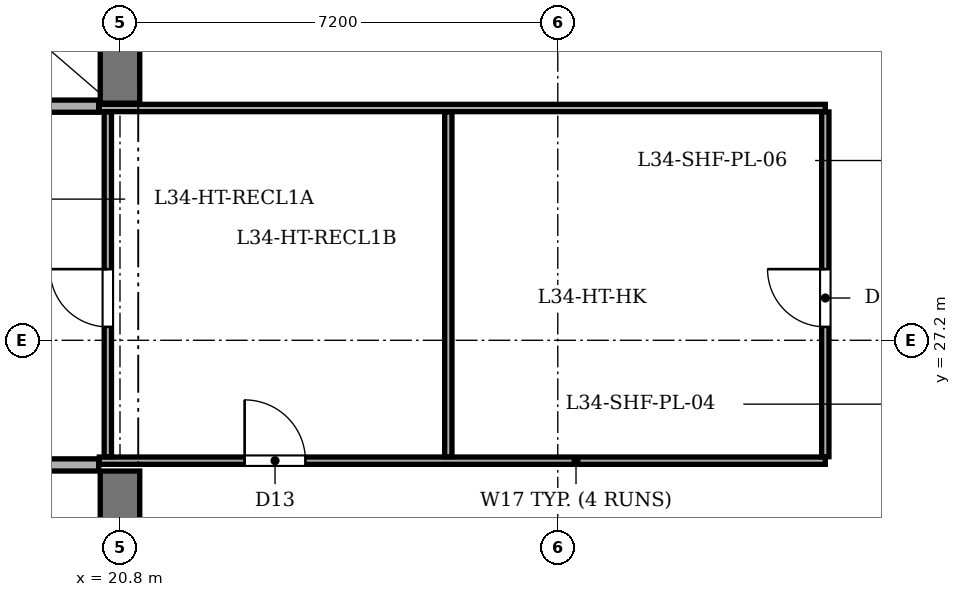
"""IFC4 building model, lengths in metres.
Left out: names, types, materials, properties, quantities, classifications, styles, units other than length and angle.
Written with IfcOpenShell. Run it as: python <this file> out.ifc"""

import sys

from ifc_helpers import new_model, si_unit, direction, frame, frame_2d, origin, place, context, subcontext, project, spatial, rectangle, extrude, element, fill, save


model = new_model("IFC4")
c1 = context("Model", 3, precision=1e-05, world=origin(), true_north=direction((0.0, 1.0)))
c2 = subcontext(c1, "Body", "Model", "MODEL_VIEW")
j1 = project(units=[si_unit("LENGTHUNIT", "METRE"), si_unit("PLANEANGLEUNIT", "RADIAN")], contexts=[c1])
p1 = place(None, origin())
s1 = spatial("IfcSite", under=j1, at=p1, CompositionType="ELEMENT")
p2 = place(p1, origin())
s2 = spatial("IfcBuilding", under=s1, at=p2, CompositionType="ELEMENT")
p3 = place(p2, frame((0.0, 0.0, 137.8)))
s3 = spatial("IfcBuildingStorey", under=s2, at=p3, CompositionType="ELEMENT", Elevation=137.8)
p4 = place(p3, frame((20.8, 21.305, 0.0), z_axis=(0.0, 0.0, 1.0), x_axis=(0.0, 1.0, 0.0)))
e1 = element("IfcWall", 1, at=p4, inside=s3, PredefinedType="SHEAR", context=c2, shape_type="SweptSolid", body=[
    extrude(rectangle(XDim=3.745, YDim=0.65, at=frame_2d((1.873, 0.0))), origin(), (0.0, 0.0, 1.0), 3.05),
])
p5 = place(p4, frame((1.295, 0.0, 0.0)))
e2 = element("IfcOpeningElement", 2, at=p5, cuts=e1, PredefinedType="OPENING", context=c2, shape_type="SweptSolid", body=[
    extrude(rectangle(XDim=1.2, YDim=2.15, at=frame_2d((0.6, 1.075))), frame((0.0, 0.335, 0.0), z_axis=(0.0, -1.0, 0.0), x_axis=(1.0, 0.0, 0.0)), (0.0, 0.0, 1.0), 0.67),
])
p6 = place(p3, frame((20.8, 31.1, 0.0), z_axis=(0.0, 0.0, 1.0), x_axis=(0.0, 1.0, 0.0)))
e3 = element("IfcWall", 3, at=p6, inside=s3, PredefinedType="SHEAR", context=c2, shape_type="SweptSolid", body=[
    extrude(rectangle(XDim=1.995, YDim=0.65, at=frame_2d((0.998, 0.0))), origin(), (0.0, 0.0, 1.0), 3.05),
])
for number, where, z_axis, x_axis in (
    (4, (16.6, 25.15, 0.0), (0.0, 0.0, 1.0), (1.0, 0.0, 0.0)),
    (5, (16.6, 31.05, 0.0), (0.0, 0.0, 1.0), (1.0, 0.0, 0.0)),
):
    element("IfcWall", number, at=place(p3, frame(where, z_axis=z_axis, x_axis=x_axis)), inside=s3, PredefinedType="SOLIDWALL", context=c2, shape_type="SweptSolid", body=[
        extrude(rectangle(XDim=3.85, YDim=0.2, at=frame_2d((1.925, 0.0))), origin(), (0.0, 0.0, 1.0), 3.05),
    ])
p7 = place(p3, frame((20.46, 25.22, 0.0), z_axis=(0.0, 0.0, 1.0), x_axis=(1.0, 0.0, 0.0)))
e6 = element("IfcWall", 6, at=p7, inside=s3, PredefinedType="PARTITIONING", context=c2, shape_type="SweptSolid", body=[
    extrude(rectangle(XDim=11.94, YDim=0.12, at=frame_2d((5.97, 0.0))), origin(), (0.0, 0.0, 1.0), 3.05),
])
p8 = place(p7, frame((2.39, 0.0, 0.0)))
e7 = element("IfcOpeningElement", 7, at=p8, cuts=e6, PredefinedType="OPENING", context=c2, shape_type="SweptSolid", body=[
    extrude(rectangle(XDim=1.0, YDim=2.1, at=frame_2d((0.5, 1.05))), frame((0.0, 0.07, 0.0), z_axis=(0.0, -1.0, 0.0), x_axis=(1.0, 0.0, 0.0)), (0.0, 0.0, 1.0), 0.14),
])
p9 = place(p3, frame((20.46, 31.02, 0.0), z_axis=(0.0, 0.0, 1.0), x_axis=(1.0, 0.0, 0.0)))
e8 = element("IfcWall", 8, at=p9, inside=s3, PredefinedType="PARTITIONING", context=c2, shape_type="SweptSolid", body=[
    extrude(rectangle(XDim=11.94, YDim=0.12, at=frame_2d((5.97, 0.0))), origin(), (0.0, 0.0, 1.0), 3.05),
])
p10 = place(p3, frame((32.4, 25.285, 0.0), z_axis=(0.0, 0.0, 1.0), x_axis=(0.0, 1.0, 0.0)))
e9 = element("IfcWall", 9, at=p10, inside=s3, PredefinedType="PARTITIONING", context=c2, shape_type="SweptSolid", body=[
    extrude(rectangle(XDim=5.67, YDim=0.12, at=frame_2d((2.835, 0.0))), origin(), (0.0, 0.0, 1.0), 3.05),
])
p11 = place(p10, frame((2.135, 0.0, 0.0)))
e10 = element("IfcOpeningElement", 10, at=p11, cuts=e9, PredefinedType="OPENING", context=c2, shape_type="SweptSolid", body=[
    extrude(rectangle(XDim=0.95, YDim=2.1, at=frame_2d((0.475, 1.05))), frame((0.0, 0.07, 0.0), z_axis=(0.0, -1.0, 0.0), x_axis=(1.0, 0.0, 0.0)), (0.0, 0.0, 1.0), 0.14),
])
p12 = place(p3, frame((20.6, 25.285, 0.0), z_axis=(0.0, 0.0, 1.0), x_axis=(0.0, 1.0, 0.0)))
e11 = element("IfcWall", 11, at=p12, inside=s3, PredefinedType="PARTITIONING", context=c2, shape_type="SweptSolid", body=[
    extrude(rectangle(XDim=5.67, YDim=0.12, at=frame_2d((2.835, 0.0))), origin(), (0.0, 0.0, 1.0), 2.585),
])
p13 = place(p12, frame((2.135, 0.0, 0.0)))
e12 = element("IfcOpeningElement", 12, at=p13, cuts=e11, PredefinedType="OPENING", context=c2, shape_type="SweptSolid", body=[
    extrude(rectangle(XDim=0.95, YDim=2.1, at=frame_2d((0.475, 1.05))), frame((0.0, 0.07, 0.0), z_axis=(0.0, -1.0, 0.0), x_axis=(1.0, 0.0, 0.0)), (0.0, 0.0, 1.0), 0.14),
])
p14 = place(p3, frame((26.2, 25.285, 0.0), z_axis=(0.0, 0.0, 1.0), x_axis=(0.0, 1.0, 0.0)))
e13 = element("IfcWall", 13, at=p14, inside=s3, PredefinedType="PARTITIONING", context=c2, shape_type="SweptSolid", body=[
    extrude(rectangle(XDim=5.67, YDim=0.12, at=frame_2d((2.835, 0.0))), origin(), (0.0, 0.0, 1.0), 3.05),
])
p15 = place(p13, origin())
e14 = element("IfcDoor", 14, at=p15, inside=s3, OperationType="SINGLE_SWING_RIGHT", PredefinedType="DOOR", context=c2, shape_type="SweptSolid", body=[
    extrude(rectangle(XDim=0.95, YDim=2.1, at=frame_2d((0.475, 1.05))), frame((0.0, 0.025, 0.0), z_axis=(0.0, -1.0, 0.0), x_axis=(1.0, 0.0, 0.0)), (0.0, 0.0, 1.0), 0.05),
])
fill(e12, e14)
p16 = place(p8, origin())
e15 = element("IfcDoor", 15, at=p16, inside=s3, OperationType="SINGLE_SWING_LEFT", PredefinedType="DOOR", context=c2, shape_type="SweptSolid", body=[
    extrude(rectangle(XDim=1.0, YDim=2.1, at=frame_2d((0.5, 1.05))), frame((0.0, 0.025, 0.0), z_axis=(0.0, -1.0, 0.0), x_axis=(1.0, 0.0, 0.0)), (0.0, 0.0, 1.0), 0.05),
])
fill(e7, e15)
p17 = place(p11, origin())
e16 = element("IfcDoor", 16, at=p17, inside=s3, OperationType="SINGLE_SWING_RIGHT", PredefinedType="DOOR", context=c2, shape_type="SweptSolid", body=[
    extrude(rectangle(XDim=0.95, YDim=2.1, at=frame_2d((0.475, 1.05))), frame((0.0, 0.025, 0.0), z_axis=(0.0, -1.0, 0.0), x_axis=(1.0, 0.0, 0.0)), (0.0, 0.0, 1.0), 0.05),
])
fill(e10, e16)
save(model, sys.argv[1])
